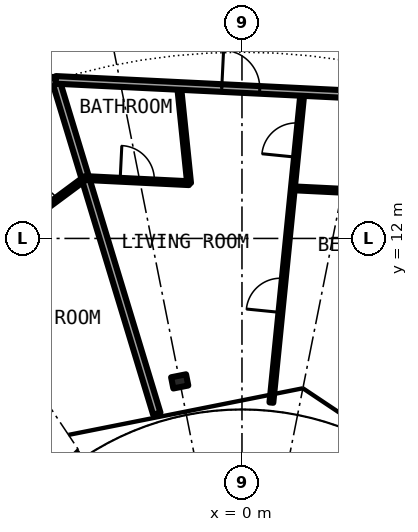
"""IFC4 building model, lengths in metres.
Left out: names, types, materials, properties, quantities, classifications, styles, units other than length and angle.
Written with IfcOpenShell. Run it as: python <this file> out.ifc"""

import sys

from ifc_helpers import new_model, si_unit, direction, frame, frame_2d, origin, origin_2d, place, context, subcontext, project, spatial, rectangle, i_section, extrude, element, fill, save


model = new_model("IFC4")
c1 = context("Model", 3, precision=1e-05, world=origin(), true_north=direction((0.0, 1.0)))
c2 = subcontext(c1, "Body", "Model", "MODEL_VIEW")
j1 = project(units=[si_unit("LENGTHUNIT", "METRE"), si_unit("PLANEANGLEUNIT", "RADIAN")], contexts=[c1])
p1 = place(None, origin())
s1 = spatial("IfcSite", under=j1, at=p1, CompositionType="ELEMENT")
p2 = place(p1, origin())
s2 = spatial("IfcBuilding", under=s1, at=p2, CompositionType="ELEMENT")
p3 = place(p2, frame((0.0, 0.0, 81.9)))
s3 = spatial("IfcBuildingStorey", under=s2, at=p3, CompositionType="ELEMENT", Elevation=81.9)
p4 = place(p3, frame((-1.639, 8.239, 0.0), z_axis=(0.0, 0.0, 1.0), x_axis=(-0.195090322016, 0.980785280403, 0.0)))
e1 = element("IfcColumn", 1, at=p4, inside=s3, PredefinedType="COLUMN", context=c2, shape_type="SweptSolid", body=[
    extrude(i_section(OverallWidth=0.3, OverallDepth=0.4, WebThickness=0.013, FlangeThickness=0.024, FilletRadius=0.027, at=origin_2d()), origin(), (0.0, 0.0, 1.0), 3.05),
])
p5 = place(p3, frame((-10.132, 12.296, 0.0), z_axis=(0.0, 0.0, 1.0), x_axis=(0.635976043025, -0.771708800454, 0.0)))
e2 = element("IfcWall", 2, at=p5, inside=s3, PredefinedType="PARTITIONING", context=c2, shape_type="SweptSolid", body=[
    extrude(rectangle(XDim=8.213, YDim=0.1, at=frame_2d((4.106, 0.0))), origin(), (0.0, 0.0, 1.0), 2.7),
])
p6 = place(p5, frame((0.823, 0.0, 0.0)))
e3 = element("IfcOpeningElement", 3, at=p6, cuts=e2, PredefinedType="OPENING", context=c2, shape_type="SweptSolid", body=[
    extrude(rectangle(XDim=0.9, YDim=2.3, at=frame_2d((0.45, 1.15))), frame((0.0, 0.06, 0.0), z_axis=(0.0, -1.0, 0.0), x_axis=(1.0, 0.0, 0.0)), (0.0, 0.0, 1.0), 0.12),
])
p7 = place(p5, frame((4.929, 0.0, 0.0)))
e4 = element("IfcOpeningElement", 4, at=p7, cuts=e2, PredefinedType="OPENING", context=c2, shape_type="SweptSolid", body=[
    extrude(rectangle(XDim=0.9, YDim=2.3, at=frame_2d((0.45, 1.15))), frame((0.0, 0.06, 0.0), z_axis=(0.0, -1.0, 0.0), x_axis=(1.0, 0.0, 0.0)), (0.0, 0.0, 1.0), 0.12),
])
p8 = place(p3, frame((-4.906, 16.172, 0.0), z_axis=(0.0, 0.0, 1.0), x_axis=(0.290323311932, -0.956928615179, 0.0)))
e5 = element("IfcWall", 5, at=p8, inside=s3, PredefinedType="PARTITIONING", context=c2, shape_type="SweptSolid", body=[
    extrude(rectangle(XDim=9.179, YDim=0.2, at=frame_2d((4.59, 0.0))), origin(), (0.0, 0.0, 1.0), 2.7),
])
p9 = place(p3, frame((-1.656, 16.013, 0.0), z_axis=(0.0, 0.0, 1.0), x_axis=(0.102594773028, -0.994723234145, 0.0)))
e6 = element("IfcWall", 6, at=p9, inside=s3, PredefinedType="PARTITIONING", context=c2, shape_type="SweptSolid", body=[
    extrude(rectangle(XDim=2.573, YDim=0.1, at=frame_2d((1.286, 0.0))), origin(), (0.0, 0.0, 1.0), 2.7),
])
p10 = place(p3, frame((0.774, 7.681, 0.0), z_axis=(0.0, 0.0, 1.0), x_axis=(0.099730339513, 0.995014502096, 0.0)))
e7 = element("IfcWall", 7, at=p10, inside=s3, PredefinedType="PARTITIONING", context=c2, shape_type="SweptSolid", body=[
    extrude(rectangle(XDim=8.213, YDim=0.1, at=frame_2d((4.106, 0.0))), origin(), (0.0, 0.0, 1.0), 2.7),
])
p11 = place(p10, frame((6.49, 0.0, 0.0)))
e8 = element("IfcOpeningElement", 8, at=p11, cuts=e7, PredefinedType="OPENING", context=c2, shape_type="SweptSolid", body=[
    extrude(rectangle(XDim=0.9, YDim=2.3, at=frame_2d((0.45, 1.15))), frame((0.0, 0.06, 0.0), z_axis=(0.0, -1.0, 0.0), x_axis=(1.0, 0.0, 0.0)), (0.0, 0.0, 1.0), 0.12),
])
p12 = place(p10, frame((2.384, 0.0, 0.0)))
e9 = element("IfcOpeningElement", 9, at=p12, cuts=e7, PredefinedType="OPENING", context=c2, shape_type="SweptSolid", body=[
    extrude(rectangle(XDim=0.9, YDim=2.3, at=frame_2d((0.45, 1.15))), frame((0.0, 0.06, 0.0), z_axis=(0.0, -1.0, 0.0), x_axis=(1.0, 0.0, 0.0)), (0.0, 0.0, 1.0), 0.12),
])
p13 = place(p3, frame((-6.318, 11.96, 0.0), z_axis=(0.0, 0.0, 1.0), x_axis=(0.803128348509, 0.595806055542, 0.0)))
e10 = element("IfcWall", 10, at=p13, inside=s3, PredefinedType="PARTITIONING", context=c2, shape_type="SweptSolid", body=[
    extrude(rectangle(XDim=2.734, YDim=0.1, at=frame_2d((1.367, 0.0))), origin(), (0.0, 0.0, 1.0), 2.7),
])
p14 = place(p13, frame((0.917, 0.0, 0.0)))
e11 = element("IfcOpeningElement", 11, at=p14, cuts=e10, PredefinedType="OPENING", context=c2, shape_type="SweptSolid", body=[
    extrude(rectangle(XDim=0.9, YDim=2.3, at=frame_2d((0.45, 1.15))), frame((0.0, 0.06, 0.0), z_axis=(0.0, -1.0, 0.0), x_axis=(1.0, 0.0, 0.0)), (0.0, 0.0, 1.0), 0.12),
])
p15 = place(p3, frame((-4.122, 13.589, 0.0), z_axis=(0.0, 0.0, 1.0), x_axis=(0.998779365748, -0.049394114582, 0.0)))
e12 = element("IfcWall", 12, at=p15, inside=s3, PredefinedType="PARTITIONING", context=c2, shape_type="SweptSolid", body=[
    extrude(rectangle(XDim=2.733, YDim=0.1, at=frame_2d((1.367, 0.0))), origin(), (0.0, 0.0, 1.0), 2.7),
])
p16 = place(p15, frame((0.917, 0.0, 0.0)))
e13 = element("IfcOpeningElement", 13, at=p16, cuts=e12, PredefinedType="OPENING", context=c2, shape_type="SweptSolid", body=[
    extrude(rectangle(XDim=0.9, YDim=2.3, at=frame_2d((0.45, 1.15))), frame((0.0, 0.06, 0.0), z_axis=(0.0, -1.0, 0.0), x_axis=(1.0, 0.0, 0.0)), (0.0, 0.0, 1.0), 0.12),
])
p17 = place(p3, frame((1.344, 13.319, 0.0), z_axis=(0.0, 0.0, 1.0), x_axis=(0.998772010578, -0.049542616872, 0.0)))
e14 = element("IfcWall", 14, at=p17, inside=s3, PredefinedType="PARTITIONING", context=c2, shape_type="SweptSolid", body=[
    extrude(rectangle(XDim=4.1, YDim=0.1, at=frame_2d((2.05, 0.0))), origin(), (0.0, 0.0, 1.0), 2.7),
])
p18 = place(p3, frame((-14.052, 9.389, 0.0), z_axis=(0.0, 0.0, 1.0), x_axis=(0.803204584823, 0.59570327758, 0.0)))
e15 = element("IfcWall", 15, at=p18, inside=s3, PredefinedType="PARTITIONING", context=c2, shape_type="SweptSolid", body=[
    extrude(rectangle(XDim=11.387, YDim=0.2, at=frame_2d((5.693, 0.0))), origin(), (0.0, 0.0, 1.0), 2.7),
])
p19 = place(p18, frame((6.007, 0.0, 0.0)))
e16 = element("IfcOpeningElement", 16, at=p19, cuts=e15, PredefinedType="OPENING", context=c2, shape_type="SweptSolid", body=[
    extrude(rectangle(XDim=1.0, YDim=2.3, at=frame_2d((0.5, 1.15))), frame((0.0, 0.11, 0.0), z_axis=(0.0, -1.0, 0.0), x_axis=(1.0, 0.0, 0.0)), (0.0, 0.0, 1.0), 0.22),
])
p20 = place(p3, frame((-4.903, 16.172, 0.0), z_axis=(0.0, 0.0, 1.0), x_axis=(0.998797695979, -0.049022061427, 0.0)))
e17 = element("IfcWall", 17, at=p20, inside=s3, PredefinedType="PARTITIONING", context=c2, shape_type="SweptSolid", body=[
    extrude(rectangle(XDim=11.385, YDim=0.2, at=frame_2d((5.692, 0.0))), origin(), (0.0, 0.0, 1.0), 2.7),
])
p21 = place(p20, frame((4.376, 0.0, 0.0)))
e18 = element("IfcOpeningElement", 18, at=p21, cuts=e17, PredefinedType="OPENING", context=c2, shape_type="SweptSolid", body=[
    extrude(rectangle(XDim=1.0, YDim=2.3, at=frame_2d((0.5, 1.15))), frame((0.0, 0.11, 0.0), z_axis=(0.0, -1.0, 0.0), x_axis=(1.0, 0.0, 0.0)), (0.0, 0.0, 1.0), 0.22),
])
p22 = place(p21, origin())
e19 = element("IfcDoor", 19, at=p22, inside=s3, OperationType="SINGLE_SWING_LEFT", PredefinedType="DOOR", context=c2, shape_type="SweptSolid", body=[
    extrude(rectangle(XDim=1.0, YDim=2.3, at=frame_2d((0.5, 1.15))), frame((0.0, 0.025, 0.0), z_axis=(0.0, -1.0, 0.0), x_axis=(1.0, 0.0, 0.0)), (0.0, 0.0, 1.0), 0.05),
])
fill(e18, e19)
p23 = place(p16, origin())
e20 = element("IfcDoor", 20, at=p23, inside=s3, OperationType="SINGLE_SWING_LEFT", PredefinedType="DOOR", context=c2, shape_type="SweptSolid", body=[
    extrude(rectangle(XDim=0.9, YDim=2.3, at=frame_2d((0.45, 1.15))), frame((0.0, 0.025, 0.0), z_axis=(0.0, -1.0, 0.0), x_axis=(1.0, 0.0, 0.0)), (0.0, 0.0, 1.0), 0.05),
])
fill(e13, e20)
p24 = place(p11, origin())
e21 = element("IfcDoor", 21, at=p24, inside=s3, OperationType="SINGLE_SWING_RIGHT", PredefinedType="DOOR", context=c2, shape_type="SweptSolid", body=[
    extrude(rectangle(XDim=0.9, YDim=2.3, at=frame_2d((0.45, 1.15))), frame((0.0, 0.025, 0.0), z_axis=(0.0, -1.0, 0.0), x_axis=(1.0, 0.0, 0.0)), (0.0, 0.0, 1.0), 0.05),
])
fill(e8, e21)
p25 = place(p12, origin())
e22 = element("IfcDoor", 22, at=p25, inside=s3, OperationType="SINGLE_SWING_LEFT", PredefinedType="DOOR", context=c2, shape_type="SweptSolid", body=[
    extrude(rectangle(XDim=0.9, YDim=2.3, at=frame_2d((0.45, 1.15))), frame((0.0, 0.025, 0.0), z_axis=(0.0, -1.0, 0.0), x_axis=(1.0, 0.0, 0.0)), (0.0, 0.0, 1.0), 0.05),
])
fill(e9, e22)
p26 = place(p14, origin())
e23 = element("IfcDoor", 23, at=p26, inside=s3, OperationType="SINGLE_SWING_RIGHT", PredefinedType="DOOR", context=c2, shape_type="SweptSolid", body=[
    extrude(rectangle(XDim=0.9, YDim=2.3, at=frame_2d((0.45, 1.15))), frame((0.0, 0.025, 0.0), z_axis=(0.0, -1.0, 0.0), x_axis=(1.0, 0.0, 0.0)), (0.0, 0.0, 1.0), 0.05),
])
fill(e11, e23)
save(model, sys.argv[1])
